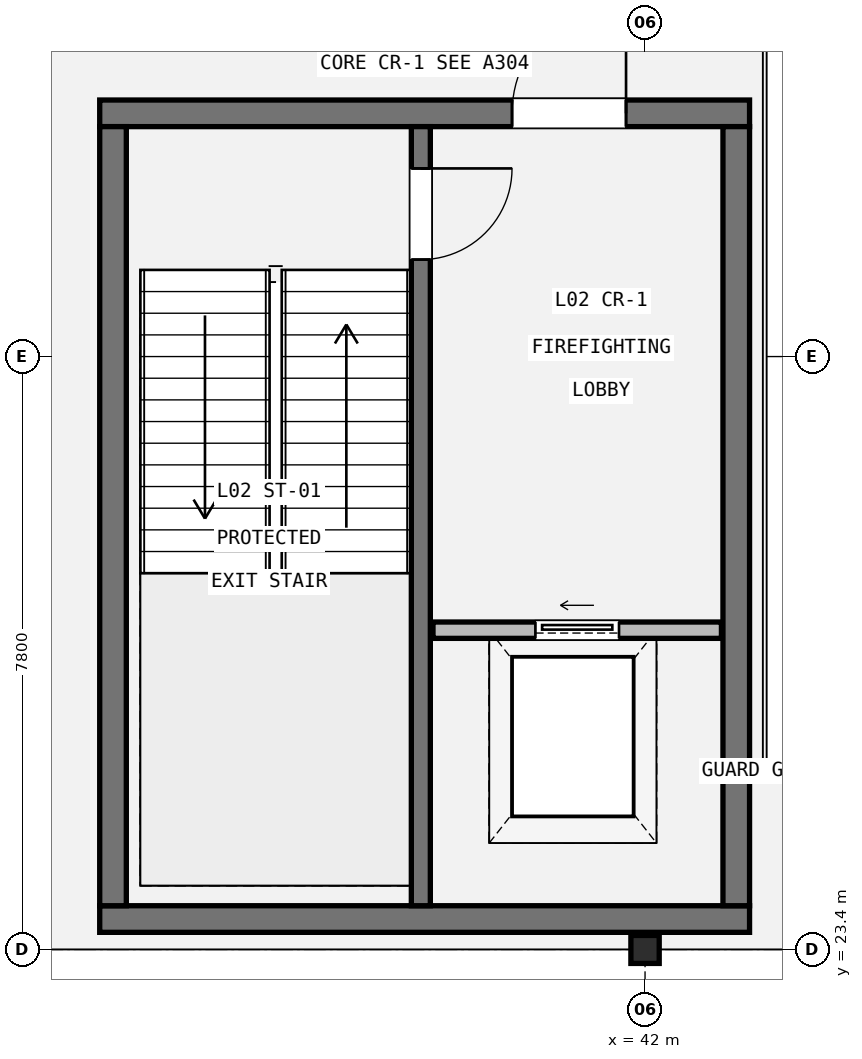
"""IFC4 building model, lengths in metres.
Left out: names, types, materials, properties, quantities, classifications, styles, units other than length and angle.
Written with IfcOpenShell. Run it as: python <this file> out.ifc"""

import sys

from ifc_helpers import new_model, si_unit, direction, frame, frame_2d, origin, origin_2d, place, context, subcontext, project, spatial, rectangle, i_section, extrude, element, fill, save


model = new_model("IFC4")
c1 = context("Model", 3, precision=1e-05, world=origin(), true_north=direction((0.0, 1.0)))
c2 = subcontext(c1, "Body", "Model", "MODEL_VIEW")
j1 = project(units=[si_unit("LENGTHUNIT", "METRE"), si_unit("PLANEANGLEUNIT", "RADIAN")], contexts=[c1])
p1 = place(None, origin())
s1 = spatial("IfcSite", under=j1, at=p1, CompositionType="ELEMENT")
p2 = place(p1, origin())
s2 = spatial("IfcBuilding", under=s1, at=p2, CompositionType="ELEMENT")
p3 = place(p2, frame((0.0, 0.0, 10.2)))
s3 = spatial("IfcBuildingStorey", under=s2, at=p3, CompositionType="ELEMENT", Elevation=10.2)
p4 = place(p3, frame((42.0, 23.4, 0.0), z_axis=(0.0, 0.0, 1.0), x_axis=(1.0, 0.0, 0.0)))
e1 = element("IfcColumn", 1, at=p4, inside=s3, PredefinedType="COLUMN", context=c2, shape_type="SweptSolid", body=[
    extrude(i_section(OverallWidth=0.373, OverallDepth=0.368, WebThickness=0.014, FlangeThickness=0.024, FilletRadius=0.015, at=origin_2d()), origin(), (0.0, 0.0, 1.0), 4.8),
])
p5 = place(p3, frame((43.375, 23.8, 0.0), z_axis=(0.0, 0.0, 1.0), x_axis=(-1.0, 0.0, 0.0)))
e2 = element("IfcWall", 2, at=p5, inside=s3, PredefinedType="SHEAR", context=c2, shape_type="SweptSolid", body=[
    extrude(rectangle(XDim=8.55, YDim=0.35, at=frame_2d((4.275, 0.0))), origin(), (0.0, 0.0, 1.0), 4.6),
])
p6 = place(p3, frame((34.825, 34.4, 0.0), z_axis=(0.0, 0.0, 1.0), x_axis=(1.0, 0.0, 0.0)))
e3 = element("IfcWall", 3, at=p6, inside=s3, PredefinedType="SHEAR", context=c2, shape_type="SweptSolid", body=[
    extrude(rectangle(XDim=8.55, YDim=0.35, at=frame_2d((4.275, 0.0))), origin(), (0.0, 0.0, 1.0), 4.6),
])
p7 = place(p6, frame((5.425, 0.0, 0.0)))
e4 = element("IfcOpeningElement", 4, at=p7, cuts=e3, PredefinedType="OPENING", context=c2, shape_type="SweptSolid", body=[
    extrude(rectangle(XDim=1.5, YDim=2.15, at=frame_2d((0.75, 1.075))), frame((0.0, 0.185, 0.0), z_axis=(0.0, -1.0, 0.0), x_axis=(1.0, 0.0, 0.0)), (0.0, 0.0, 1.0), 0.37),
])
for number, where, z_axis, x_axis in (
    (5, (35.0, 23.975, 0.0), (0.0, 0.0, 1.0), (0.0, 1.0, 0.0)),
    (6, (43.2, 34.225, 0.0), (0.0, 0.0, 1.0), (0.0, -1.0, 0.0)),
):
    element("IfcWall", number, at=place(p3, frame(where, z_axis=z_axis, x_axis=x_axis)), inside=s3, PredefinedType="SHEAR", context=c2, shape_type="SweptSolid", body=[
        extrude(rectangle(XDim=10.25, YDim=0.35, at=frame_2d((5.125, 0.0))), origin(), (0.0, 0.0, 1.0), 4.6),
    ])
p8 = place(p3, frame((39.05, 34.225, 0.0), z_axis=(0.0, 0.0, 1.0), x_axis=(0.0, -1.0, 0.0)))
e7 = element("IfcWall", 7, at=p8, inside=s3, PredefinedType="SHEAR", context=c2, shape_type="SweptSolid", body=[
    extrude(rectangle(XDim=10.25, YDim=0.25, at=frame_2d((5.125, 0.0))), origin(), (0.0, 0.0, 1.0), 4.6),
])
p9 = place(p8, frame((0.55, 0.0, 0.0)))
e8 = element("IfcOpeningElement", 8, at=p9, cuts=e7, PredefinedType="OPENING", context=c2, shape_type="SweptSolid", body=[
    extrude(rectangle(XDim=1.2, YDim=2.15, at=frame_2d((0.6, 1.075))), frame((0.0, 0.135, 0.0), z_axis=(0.0, -1.0, 0.0), x_axis=(1.0, 0.0, 0.0)), (0.0, 0.0, 1.0), 0.27),
])
p10 = place(p3, frame((39.21, 27.6, 0.0), z_axis=(0.0, 0.0, 1.0), x_axis=(1.0, 0.0, 0.0)))
e9 = element("IfcWall", 9, at=p10, inside=s3, PredefinedType="STANDARD", context=c2, shape_type="SweptSolid", body=[
    extrude(rectangle(XDim=3.795, YDim=0.215, at=frame_2d((1.897, 0.0))), origin(), (0.0, 0.0, 1.0), 4.592),
])
p11 = place(p10, frame((1.347, 0.0, 0.0)))
e10 = element("IfcOpeningElement", 10, at=p11, cuts=e9, PredefinedType="OPENING", context=c2, shape_type="SweptSolid", body=[
    extrude(rectangle(XDim=1.1, YDim=2.2, at=frame_2d((0.55, 1.1))), frame((0.0, 0.117, 0.0), z_axis=(0.0, -1.0, 0.0), x_axis=(1.0, 0.0, 0.0)), (0.0, 0.0, 1.0), 0.235),
])
p12 = place(p9, origin())
e11 = element("IfcDoor", 11, at=p12, inside=s3, OperationType="SINGLE_SWING_LEFT", PredefinedType="DOOR", context=c2, shape_type="SweptSolid", body=[
    extrude(rectangle(XDim=1.2, YDim=2.15, at=frame_2d((0.6, 1.075))), frame((0.0, 0.025, 0.0), z_axis=(0.0, -1.0, 0.0), x_axis=(1.0, 0.0, 0.0)), (0.0, 0.0, 1.0), 0.05),
])
fill(e8, e11)
p13 = place(p7, origin())
e12 = element("IfcDoor", 12, at=p13, inside=s3, OperationType="SINGLE_SWING_RIGHT", PredefinedType="DOOR", context=c2, shape_type="SweptSolid", body=[
    extrude(rectangle(XDim=1.5, YDim=2.15, at=frame_2d((0.75, 1.075))), frame((0.0, 0.025, 0.0), z_axis=(0.0, -1.0, 0.0), x_axis=(1.0, 0.0, 0.0)), (0.0, 0.0, 1.0), 0.05),
])
fill(e4, e12)
p14 = place(p11, origin())
e13 = element("IfcDoor", 13, at=p14, inside=s3, OperationType="SLIDING_TO_LEFT", PredefinedType="DOOR", context=c2, shape_type="SweptSolid", body=[
    extrude(rectangle(XDim=1.1, YDim=2.2, at=frame_2d((0.55, 1.1))), frame((0.0, 0.025, 0.0), z_axis=(0.0, -1.0, 0.0), x_axis=(1.0, 0.0, 0.0)), (0.0, 0.0, 1.0), 0.05),
])
fill(e10, e13)
save(model, sys.argv[1])
